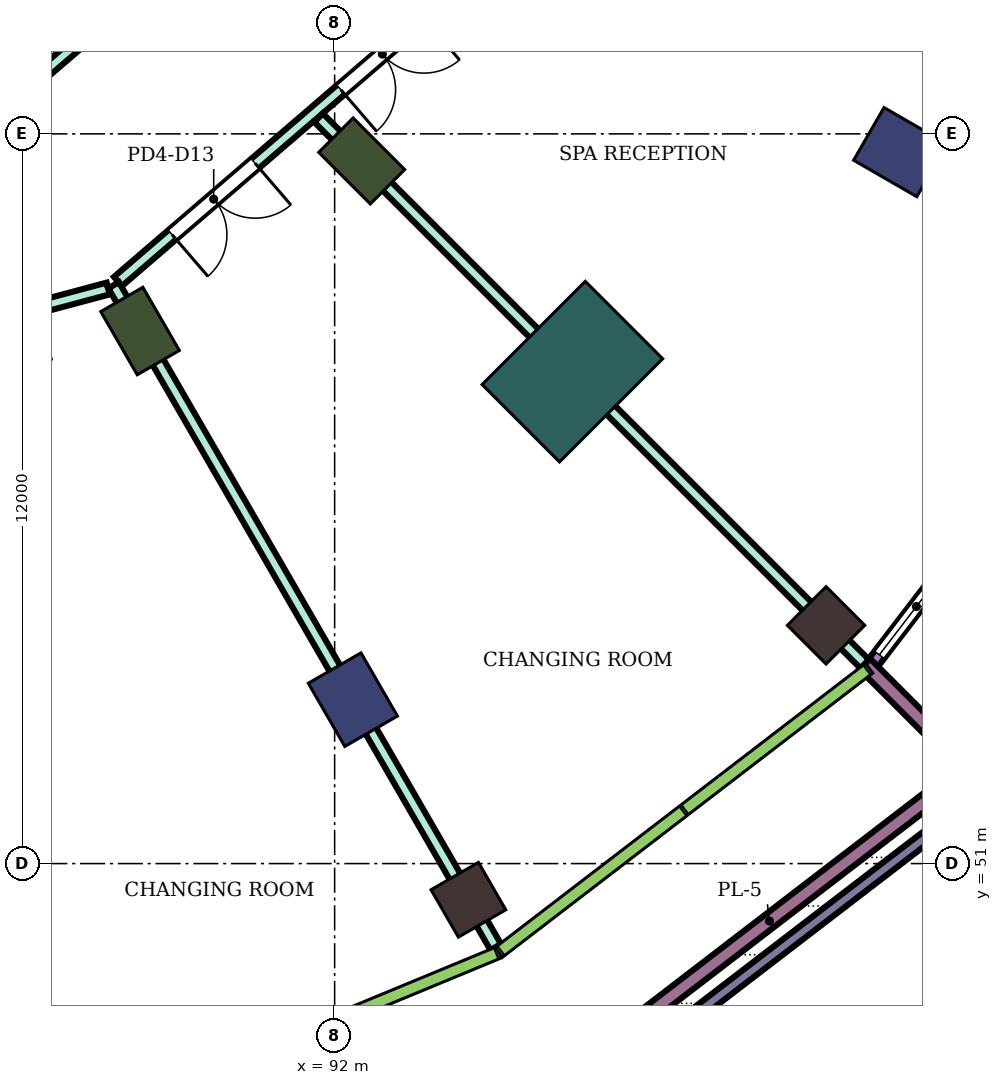
"""IFC4 building model, lengths in metres.
Left out: names, types, materials, properties, quantities, classifications, styles, units other than length and angle.
Written with IfcOpenShell. Run it as: python <this file> out.ifc"""

import sys

from ifc_helpers import new_model, si_unit, direction, frame, frame_2d, origin, origin_2d, place, context, subcontext, project, spatial, rectangle, extrude, element, fill, save


model = new_model("IFC4")
c1 = context("Model", 3, precision=1e-05, world=origin(), true_north=direction((0.0, 1.0)))
c2 = subcontext(c1, "Body", "Model", "MODEL_VIEW")
j1 = project(units=[si_unit("LENGTHUNIT", "METRE"), si_unit("PLANEANGLEUNIT", "RADIAN")], contexts=[c1])
p1 = place(None, origin())
s1 = spatial("IfcSite", under=j1, at=p1, CompositionType="ELEMENT")
p2 = place(p1, origin())
s2 = spatial("IfcBuilding", under=s1, at=p2, CompositionType="ELEMENT")
p3 = place(p2, frame((0.0, 0.0, 23.8)))
s3 = spatial("IfcBuildingStorey", under=s2, at=p3, CompositionType="ELEMENT", Elevation=23.8)
for number, where, z_axis, x_axis in (
    (1, (94.2, 50.405, 0.0), (0.0, 0.0, 1.0), (0.5, -0.866, 0.0)),
    (2, (100.082, 54.918, 0.0), (0.0, 0.0, 1.0), (0.707, -0.707, 0.0)),
):
    element("IfcColumn", number, at=place(p3, frame(where, z_axis=z_axis, x_axis=x_axis)), inside=s3, PredefinedType="COLUMN", context=c2, shape_type="SweptSolid", body=[
        extrude(rectangle(XDim=0.9, YDim=0.9, at=origin_2d()), origin(), (0.0, 0.0, 1.0), 5.0),
    ])
for number, where, z_axis, x_axis in (
    (3, (92.3, 53.696, 0.0), (0.0, 0.0, 1.0), (0.5, -0.866, 0.0)),
    (4, (101.304, 62.7, 0.0), (0.0, 0.0, 1.0), (0.866, -0.5, 0.0)),
):
    element("IfcColumn", number, at=place(p3, frame(where, z_axis=z_axis, x_axis=x_axis)), inside=s3, PredefinedType="COLUMN", context=c2, shape_type="SweptSolid", body=[
        extrude(rectangle(XDim=1.2, YDim=1.0, at=origin_2d()), origin(), (0.0, 0.0, 1.0), 5.0),
    ])
for number, where, z_axis, x_axis in (
    (5, (88.8, 59.758, 0.0), (0.0, 0.0, 1.0), (0.5, -0.866, 0.0)),
    (6, (92.445, 62.555, 0.0), (0.0, 0.0, 1.0), (0.707, -0.707, 0.0)),
):
    element("IfcColumn", number, at=place(p3, frame(where, z_axis=z_axis, x_axis=x_axis)), inside=s3, PredefinedType="COLUMN", context=c2, shape_type="SweptSolid", body=[
        extrude(rectangle(XDim=1.2, YDim=0.8, at=origin_2d()), origin(), (0.0, 0.0, 1.0), 5.0),
    ])
p4 = place(p3, frame((95.91, 59.09, 0.0), z_axis=(0.0, 0.0, 1.0), x_axis=(0.707106781187, -0.707106781187, 0.0)))
e7 = element("IfcColumn", 7, at=p4, inside=s3, PredefinedType="COLUMN", context=c2, shape_type="SweptSolid", body=[
    extrude(rectangle(XDim=1.8, YDim=2.4, at=origin_2d()), origin(), (0.0, 0.0, 1.0), 5.0),
])
p5 = place(p3, frame((100.788, 54.212, 0.0), z_axis=(0.0, 0.0, 1.0), x_axis=(0.608758724447, 0.793355415567, 0.0)))
e8 = element("IfcWall", 8, at=p5, inside=s3, PredefinedType="NOTDEFINED", context=c2, shape_type="SweptSolid", body=[
    extrude(rectangle(XDim=7.675, YDim=0.2, at=frame_2d((3.837, 0.0))), origin(), (0.0, 0.0, 1.0), 5.0),
])
p6 = place(p5, frame((0.279, 0.0, 0.9)))
e9 = element("IfcOpeningElement", 9, at=p6, cuts=e8, PredefinedType="OPENING", context=c2, shape_type="SweptSolid", body=[
    extrude(rectangle(XDim=2.0, YDim=2.1, at=frame_2d((1.0, 1.05))), frame((0.0, 0.11, 0.0), z_axis=(0.0, -1.0, 0.0), x_axis=(1.0, 0.0, 0.0)), (0.0, 0.0, 1.0), 0.22),
])
p7 = place(p5, frame((2.937, 0.0, 0.0)))
e10 = element("IfcOpeningElement", 10, at=p7, cuts=e8, PredefinedType="OPENING", context=c2, shape_type="SweptSolid", body=[
    extrude(rectangle(XDim=1.8, YDim=2.4, at=frame_2d((0.9, 1.2))), frame((0.0, 0.11, 0.0), z_axis=(0.0, -1.0, 0.0), x_axis=(1.0, 0.0, 0.0)), (0.0, 0.0, 1.0), 0.22),
])
p8 = place(p5, frame((5.396, 0.0, 0.9)))
e11 = element("IfcOpeningElement", 11, at=p8, cuts=e8, PredefinedType="OPENING", context=c2, shape_type="SweptSolid", body=[
    extrude(rectangle(XDim=2.0, YDim=2.1, at=frame_2d((1.0, 1.05))), frame((0.0, 0.11, 0.0), z_axis=(0.0, -1.0, 0.0), x_axis=(1.0, 0.0, 0.0)), (0.0, 0.0, 1.0), 0.22),
])
p9 = place(p3, frame((102.757, 52.225, 0.0), z_axis=(0.0, 0.0, 1.0), x_axis=(-0.793350233536, -0.60876547779, 0.0)))
e12 = element("IfcWall", 12, at=p9, inside=s3, PredefinedType="PARAPET", context=c2, shape_type="SweptSolid", body=[
    extrude(rectangle(XDim=8.379, YDim=0.2, at=frame_2d((4.189, 0.0))), origin(), (0.0, 0.0, 1.0), 1.1),
])
p10 = place(p3, frame((102.429, 52.571, 0.0), z_axis=(0.0, 0.0, 1.0), x_axis=(-0.793350471445, -0.608765167744, 0.0)))
e13 = element("IfcWall", 13, at=p10, inside=s3, PredefinedType="USERDEFINED", context=c2, shape_type="SweptSolid", body=[
    extrude(rectangle(XDim=8.264, YDim=0.25, at=frame_2d((4.132, 0.0))), origin(), (0.0, 0.0, 1.0), 0.6),
])
p11 = place(p3, frame((102.34, 52.66, 0.0), z_axis=(0.0, 0.0, 1.0), x_axis=(-0.707106781187, 0.707106781187, 0.0)))
e14 = element("IfcWall", 14, at=p11, inside=s3, PredefinedType="USERDEFINED", context=c2, shape_type="SweptSolid", body=[
    extrude(rectangle(XDim=2.296, YDim=0.25, at=frame_2d((1.148, 0.0))), origin(), (0.0, 0.0, 1.0), 0.6),
])
p12 = place(p3, frame((80.0, 58.24, 0.0), z_axis=(0.0, 0.0, 1.0), x_axis=(0.965945381016, 0.258746054836, 0.0)))
e15 = element("IfcWall", 15, at=p12, inside=s3, PredefinedType="PARTITIONING", context=c2, shape_type="SweptSolid", body=[
    extrude(rectangle(XDim=8.568, YDim=0.2, at=frame_2d((4.284, 0.0))), origin(), (0.0, 0.0, 1.0), 4.55),
])
p13 = place(p12, frame((5.563, 0.0, 0.0)))
e16 = element("IfcOpeningElement", 16, at=p13, cuts=e15, PredefinedType="OPENING", context=c2, shape_type="SweptSolid", body=[
    extrude(rectangle(XDim=1.8, YDim=2.1, at=frame_2d((0.9, 1.05))), frame((0.0, 0.11, 0.0), z_axis=(0.0, -1.0, 0.0), x_axis=(1.0, 0.0, 0.0)), (0.0, 0.0, 1.0), 0.22),
])
p14 = place(p12, frame((1.729, 0.0, 0.0)))
e17 = element("IfcOpeningElement", 17, at=p14, cuts=e15, PredefinedType="OPENING", context=c2, shape_type="SweptSolid", body=[
    extrude(rectangle(XDim=0.9, YDim=2.1, at=frame_2d((0.45, 1.05))), frame((0.0, 0.11, 0.0), z_axis=(0.0, -1.0, 0.0), x_axis=(1.0, 0.0, 0.0)), (0.0, 0.0, 1.0), 0.22),
])
p15 = place(p3, frame((84.216, 59.266, 0.0), z_axis=(0.0, 0.0, 1.0), x_axis=(0.258822388938, -0.965924930305, 0.0)))
e18 = element("IfcWall", 18, at=p15, inside=s3, PredefinedType="PARTITIONING", context=c2, shape_type="SweptSolid", body=[
    extrude(rectangle(XDim=13.009, YDim=0.2, at=frame_2d((6.504, 0.0))), origin(), (0.0, 0.0, 1.0), 4.55),
])
p16 = place(p3, frame((86.685, 63.551, 0.0), z_axis=(0.0, 0.0, 1.0), x_axis=(0.758049900748, 0.652196556244, 0.0)))
e19 = element("IfcWall", 19, at=p16, inside=s3, PredefinedType="PARTITIONING", context=c2, shape_type="SweptSolid", body=[
    extrude(rectangle(XDim=4.675, YDim=0.2, at=frame_2d((2.337, 0.0))), origin(), (0.0, 0.0, 1.0), 4.55),
])
p17 = place(p16, frame((1.887, 0.0, 0.0)))
e20 = element("IfcOpeningElement", 20, at=p17, cuts=e19, PredefinedType="OPENING", context=c2, shape_type="SweptSolid", body=[
    extrude(rectangle(XDim=0.9, YDim=2.1, at=frame_2d((0.45, 1.05))), frame((0.0, 0.11, 0.0), z_axis=(0.0, -1.0, 0.0), x_axis=(1.0, 0.0, 0.0)), (0.0, 0.0, 1.0), 0.22),
])
p18 = place(p3, frame((88.436, 60.573, 0.0), z_axis=(0.0, 0.0, 1.0), x_axis=(0.758186248639, 0.652038045189, 0.0)))
e21 = element("IfcWall", 21, at=p18, inside=s3, PredefinedType="PARTITIONING", context=c2, shape_type="SweptSolid", body=[
    extrude(rectangle(XDim=6.882, YDim=0.2, at=frame_2d((3.441, 0.0))), origin(), (0.0, 0.0, 1.0), 4.55),
])
p19 = place(p18, frame((4.835, 0.0, 0.0)))
e22 = element("IfcOpeningElement", 22, at=p19, cuts=e21, PredefinedType="OPENING", context=c2, shape_type="SweptSolid", body=[
    extrude(rectangle(XDim=1.8, YDim=2.1, at=frame_2d((0.9, 1.05))), frame((0.0, 0.11, 0.0), z_axis=(0.0, -1.0, 0.0), x_axis=(1.0, 0.0, 0.0)), (0.0, 0.0, 1.0), 0.22),
])
p20 = place(p18, frame((1.177, 0.0, 0.0)))
e23 = element("IfcOpeningElement", 23, at=p20, cuts=e21, PredefinedType="OPENING", context=c2, shape_type="SweptSolid", body=[
    extrude(rectangle(XDim=1.8, YDim=2.1, at=frame_2d((0.9, 1.05))), frame((0.0, 0.11, 0.0), z_axis=(0.0, -1.0, 0.0), x_axis=(1.0, 0.0, 0.0)), (0.0, 0.0, 1.0), 0.22),
])
p21 = place(p3, frame((88.365, 60.511, 0.0), z_axis=(0.0, 0.0, 1.0), x_axis=(0.499998247179, -0.866026415774, 0.0)))
e24 = element("IfcWall", 24, at=p21, inside=s3, PredefinedType="PARTITIONING", context=c2, shape_type="SweptSolid", body=[
    extrude(rectangle(XDim=12.567, YDim=0.2, at=frame_2d((6.283, 0.0))), origin(), (0.0, 0.0, 1.0), 4.55),
])
p22 = place(p3, frame((91.735, 63.265, 0.0), z_axis=(0.0, 0.0, 1.0), x_axis=(0.707106781187, -0.707106781187, 0.0)))
e25 = element("IfcWall", 25, at=p22, inside=s3, PredefinedType="PARTITIONING", context=c2, shape_type="SweptSolid", body=[
    extrude(rectangle(XDim=12.702, YDim=0.2, at=frame_2d((6.351, 0.0))), origin(), (0.0, 0.0, 1.0), 4.55),
])
p23 = place(p6, origin())
e26 = element("IfcWindow", 26, at=p23, inside=s3, PartitioningType="SINGLE_PANEL", PredefinedType="WINDOW", context=c2, shape_type="SweptSolid", body=[
    extrude(rectangle(XDim=2.0, YDim=2.1, at=frame_2d((1.0, 1.05))), frame((0.0, 0.03, 0.0), z_axis=(0.0, -1.0, 0.0), x_axis=(1.0, 0.0, 0.0)), (0.0, 0.0, 1.0), 0.06),
])
fill(e9, e26)
p24 = place(p19, frame((1.8, 0.0, 0.0), z_axis=(0.0, 0.0, 1.0), x_axis=(-1.0, 0.0, 0.0)))
e27 = element("IfcDoor", 27, at=p24, inside=s3, OperationType="DOUBLE_DOOR_SINGLE_SWING", PredefinedType="DOOR", context=c2, shape_type="SweptSolid", body=[
    extrude(rectangle(XDim=1.8, YDim=2.1, at=frame_2d((0.9, 1.05))), frame((0.0, 0.025, 0.0), z_axis=(0.0, -1.0, 0.0), x_axis=(1.0, 0.0, 0.0)), (0.0, 0.0, 1.0), 0.05),
])
fill(e22, e27)
p25 = place(p20, frame((1.8, 0.0, 0.0), z_axis=(0.0, 0.0, 1.0), x_axis=(-1.0, 0.0, 0.0)))
e28 = element("IfcDoor", 28, at=p25, inside=s3, OperationType="DOUBLE_DOOR_SINGLE_SWING", PredefinedType="DOOR", context=c2, shape_type="SweptSolid", body=[
    extrude(rectangle(XDim=1.8, YDim=2.1, at=frame_2d((0.9, 1.05))), frame((0.0, 0.025, 0.0), z_axis=(0.0, -1.0, 0.0), x_axis=(1.0, 0.0, 0.0)), (0.0, 0.0, 1.0), 0.05),
])
fill(e23, e28)
save(model, sys.argv[1])
